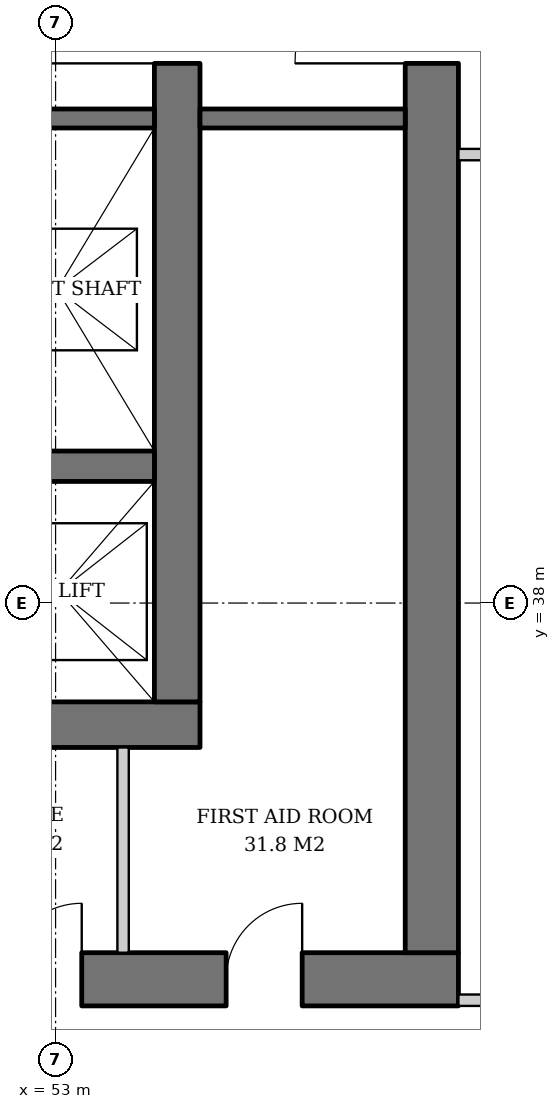
"""IFC4 building model, lengths in metres.
Left out: names, types, materials, properties, quantities, classifications, styles, units other than length and angle.
Written with IfcOpenShell. Run it as: python <this file> out.ifc"""

import sys

from ifc_helpers import new_model, si_unit, direction, frame, frame_2d, origin, place, context, subcontext, project, spatial, rectangle, extrude, element, fill, save


model = new_model("IFC4")
c1 = context("Model", 3, precision=1e-05, world=origin(), true_north=direction((0.0, 1.0)))
c2 = subcontext(c1, "Body", "Model", "MODEL_VIEW")
j1 = project(units=[si_unit("LENGTHUNIT", "METRE"), si_unit("PLANEANGLEUNIT", "RADIAN")], contexts=[c1])
p1 = place(None, origin())
s1 = spatial("IfcSite", under=j1, at=p1, CompositionType="ELEMENT")
p2 = place(p1, origin())
s2 = spatial("IfcBuilding", under=s1, at=p2, CompositionType="ELEMENT")
p3 = place(p2, frame((0.0, 0.0, 127.4)))
s3 = spatial("IfcBuildingStorey", under=s2, at=p3, CompositionType="ELEMENT", Elevation=127.4)
p4 = place(p3, frame((35.1, 36.4, 0.0), z_axis=(0.0, 0.0, 1.0), x_axis=(1.0, 0.0, 0.0)))
e1 = element("IfcWall", 1, at=p4, inside=s3, PredefinedType="SHEAR", context=c2, shape_type="SweptSolid", body=[
    extrude(rectangle(XDim=19.8, YDim=0.6, at=frame_2d((9.9, 0.0))), origin(), (0.0, 0.0, 1.0), 3.8),
])
p5 = place(p4, frame((3.9, 0.0, 0.0)))
e2 = element("IfcOpeningElement", 2, at=p5, cuts=e1, PredefinedType="OPENING", context=c2, shape_type="SweptSolid", body=[
    extrude(rectangle(XDim=1.0, YDim=2.1, at=frame_2d((0.5, 1.05))), frame((0.0, 0.31, 0.0), z_axis=(0.0, -1.0, 0.0), x_axis=(1.0, 0.0, 0.0)), (0.0, 0.0, 1.0), 0.62),
])
p6 = place(p4, frame((15.35, 0.0, 0.0)))
e3 = element("IfcOpeningElement", 3, at=p6, cuts=e1, PredefinedType="OPENING", context=c2, shape_type="SweptSolid", body=[
    extrude(rectangle(XDim=1.0, YDim=2.1, at=frame_2d((0.5, 1.05))), frame((0.0, 0.31, 0.0), z_axis=(0.0, -1.0, 0.0), x_axis=(1.0, 0.0, 0.0)), (0.0, 0.0, 1.0), 0.62),
])
p7 = place(p3, frame((54.6, 36.7, 0.0), z_axis=(0.0, 0.0, 1.0), x_axis=(0.0, 1.0, 0.0)))
e4 = element("IfcWall", 4, at=p7, inside=s3, PredefinedType="SHEAR", context=c2, shape_type="SweptSolid", body=[
    extrude(rectangle(XDim=18.6, YDim=0.6, at=frame_2d((9.3, 0.0))), origin(), (0.0, 0.0, 1.0), 3.8),
])
p8 = place(p7, frame((8.4, 0.0, 0.0)))
e5 = element("IfcOpeningElement", 5, at=p8, cuts=e4, PredefinedType="OPENING", context=c2, shape_type="SweptSolid", body=[
    extrude(rectangle(XDim=1.8, YDim=2.4, at=frame_2d((0.9, 1.2))), frame((0.0, 0.31, 0.0), z_axis=(0.0, -1.0, 0.0), x_axis=(1.0, 0.0, 0.0)), (0.0, 0.0, 1.0), 0.62),
])
p9 = place(p3, frame((31.7, 33.05, 0.0), z_axis=(0.0, 0.0, 1.0), x_axis=(1.0, 0.0, 0.0)))
e6 = element("IfcWall", 6, at=p9, inside=s3, PredefinedType="SHEAR", context=c2, shape_type="SweptSolid", body=[
    extrude(rectangle(XDim=26.6, YDim=0.7, at=frame_2d((13.3, 0.0))), origin(), (0.0, 0.0, 1.0), 3.8),
])
p10 = place(p9, frame((7.3, 0.0, 0.0)))
e7 = element("IfcOpeningElement", 7, at=p10, cuts=e6, PredefinedType="OPENING", context=c2, shape_type="SweptSolid", body=[
    extrude(rectangle(XDim=1.0, YDim=2.1, at=frame_2d((0.5, 1.05))), frame((0.0, 0.36, 0.0), z_axis=(0.0, -1.0, 0.0), x_axis=(1.0, 0.0, 0.0)), (0.0, 0.0, 1.0), 0.72),
])
p11 = place(p9, frame((18.75, 0.0, 0.0)))
e8 = element("IfcOpeningElement", 8, at=p11, cuts=e6, PredefinedType="OPENING", context=c2, shape_type="SweptSolid", body=[
    extrude(rectangle(XDim=1.0, YDim=2.1, at=frame_2d((0.5, 1.05))), frame((0.0, 0.36, 0.0), z_axis=(0.0, -1.0, 0.0), x_axis=(1.0, 0.0, 0.0)), (0.0, 0.0, 1.0), 0.72),
])
p12 = place(p9, frame((1.85, 0.0, 0.0)))
e9 = element("IfcOpeningElement", 9, at=p12, cuts=e6, PredefinedType="OPENING", context=c2, shape_type="SweptSolid", body=[
    extrude(rectangle(XDim=1.0, YDim=2.1, at=frame_2d((0.5, 1.05))), frame((0.0, 0.36, 0.0), z_axis=(0.0, -1.0, 0.0), x_axis=(1.0, 0.0, 0.0)), (0.0, 0.0, 1.0), 0.72),
])
p13 = place(p9, frame((4.7, 0.0, 0.0)))
e10 = element("IfcOpeningElement", 10, at=p13, cuts=e6, PredefinedType="OPENING", context=c2, shape_type="SweptSolid", body=[
    extrude(rectangle(XDim=1.0, YDim=2.1, at=frame_2d((0.5, 1.05))), frame((0.0, 0.36, 0.0), z_axis=(0.0, -1.0, 0.0), x_axis=(1.0, 0.0, 0.0)), (0.0, 0.0, 1.0), 0.72),
])
p14 = place(p9, frame((12.44, 0.0, 0.0)))
e11 = element("IfcOpeningElement", 11, at=p14, cuts=e6, PredefinedType="OPENING", context=c2, shape_type="SweptSolid", body=[
    extrude(rectangle(XDim=1.0, YDim=2.1, at=frame_2d((0.5, 1.05))), frame((0.0, 0.36, 0.0), z_axis=(0.0, -1.0, 0.0), x_axis=(1.0, 0.0, 0.0)), (0.0, 0.0, 1.0), 0.72),
])
p15 = place(p9, frame((20.644, 0.0, 0.0)))
e12 = element("IfcOpeningElement", 12, at=p15, cuts=e6, PredefinedType="OPENING", context=c2, shape_type="SweptSolid", body=[
    extrude(rectangle(XDim=1.0, YDim=2.1, at=frame_2d((0.5, 1.05))), frame((0.0, 0.36, 0.0), z_axis=(0.0, -1.0, 0.0), x_axis=(1.0, 0.0, 0.0)), (0.0, 0.0, 1.0), 0.72),
])
p16 = place(p9, frame((23.544, 0.0, 0.0)))
e13 = element("IfcOpeningElement", 13, at=p16, cuts=e6, PredefinedType="OPENING", context=c2, shape_type="SweptSolid", body=[
    extrude(rectangle(XDim=1.0, YDim=2.1, at=frame_2d((0.5, 1.05))), frame((0.0, 0.36, 0.0), z_axis=(0.0, -1.0, 0.0), x_axis=(1.0, 0.0, 0.0)), (0.0, 0.0, 1.0), 0.72),
])
p17 = place(p3, frame((57.95, 33.4, 0.0), z_axis=(0.0, 0.0, 1.0), x_axis=(0.0, 1.0, 0.0)))
e14 = element("IfcWall", 14, at=p17, inside=s3, PredefinedType="SHEAR", context=c2, shape_type="SweptSolid", body=[
    extrude(rectangle(XDim=25.2, YDim=0.7, at=frame_2d((12.6, 0.0))), origin(), (0.0, 0.0, 1.0), 3.8),
])
p18 = place(p17, frame((11.7, 0.0, 0.0)))
e15 = element("IfcOpeningElement", 15, at=p18, cuts=e14, PredefinedType="OPENING", context=c2, shape_type="SweptSolid", body=[
    extrude(rectangle(XDim=1.8, YDim=2.4, at=frame_2d((0.9, 1.2))), frame((0.0, 0.36, 0.0), z_axis=(0.0, -1.0, 0.0), x_axis=(1.0, 0.0, 0.0)), (0.0, 0.0, 1.0), 0.72),
])
p19 = place(p3, frame((35.7, 39.8, 0.0), z_axis=(0.0, 0.0, 1.0), x_axis=(1.0, 0.0, 0.0)))
e16 = element("IfcWall", 16, at=p19, inside=s3, PredefinedType="SHEAR", context=c2, shape_type="SweptSolid", body=[
    extrude(rectangle(XDim=18.6, YDim=0.4, at=frame_2d((9.3, 0.0))), origin(), (0.0, 0.0, 1.0), 3.8),
])
p20 = place(p3, frame((48.93, 44.375, 0.0), z_axis=(0.0, 0.0, 1.0), x_axis=(1.0, 0.0, 0.0)))
e17 = element("IfcWall", 17, at=p20, inside=s3, PredefinedType="SHEAR", context=c2, shape_type="SweptSolid", body=[
    extrude(rectangle(XDim=5.37, YDim=0.25, at=frame_2d((2.685, 0.0))), origin(), (0.0, 0.0, 1.0), 3.8),
])
p21 = place(p3, frame((54.9, 44.375, 0.0), z_axis=(0.0, 0.0, 1.0), x_axis=(1.0, 0.0, 0.0)))
e18 = element("IfcWall", 18, at=p21, inside=s3, PredefinedType="SOLIDWALL", context=c2, shape_type="SweptSolid", body=[
    extrude(rectangle(XDim=2.7, YDim=0.25, at=frame_2d((1.35, 0.0))), origin(), (0.0, 0.0, 1.0), 3.62),
])
p22 = place(p3, frame((53.888, 33.4, 0.0), z_axis=(0.0, 0.0, 1.0), x_axis=(0.0, 1.0, 0.0)))
e19 = element("IfcWall", 19, at=p22, inside=s3, PredefinedType="SOLIDWALL", context=c2, shape_type="SweptSolid", body=[
    extrude(rectangle(XDim=2.7, YDim=0.15, at=frame_2d((1.35, 0.0))), origin(), (0.0, 0.0, 1.0), 3.62),
])
for number, where, z_axis, x_axis in (
    (20, (58.3, 32.775, 0.0), (0.0, 0.0, 1.0), (1.0, 0.0, 0.0)),
    (21, (58.3, 43.9, 0.0), (0.0, 0.0, 1.0), (1.0, 0.0, 0.0)),
):
    element("IfcWall", number, at=place(p3, frame(where, z_axis=z_axis, x_axis=x_axis)), inside=s3, PredefinedType="PARTITIONING", context=c2, shape_type="SweptSolid", body=[
        extrude(rectangle(XDim=2.325, YDim=0.15, at=frame_2d((1.163, 0.0))), origin(), (0.0, 0.0, 1.0), 3.62),
    ])
p23 = place(p8, origin())
e22 = element("IfcDoor", 22, at=p23, inside=s3, OperationType="DOUBLE_DOOR_SINGLE_SWING", PredefinedType="DOOR", context=c2, shape_type="SweptSolid", body=[
    extrude(rectangle(XDim=1.8, YDim=2.4, at=frame_2d((0.9, 1.2))), frame((0.0, 0.025, 0.0), z_axis=(0.0, -1.0, 0.0), x_axis=(1.0, 0.0, 0.0)), (0.0, 0.0, 1.0), 0.05),
])
fill(e5, e22)
p24 = place(p18, origin())
e23 = element("IfcDoor", 23, at=p24, inside=s3, OperationType="DOUBLE_DOOR_SINGLE_SWING", PredefinedType="DOOR", context=c2, shape_type="SweptSolid", body=[
    extrude(rectangle(XDim=1.8, YDim=2.4, at=frame_2d((0.9, 1.2))), frame((0.0, 0.025, 0.0), z_axis=(0.0, -1.0, 0.0), x_axis=(1.0, 0.0, 0.0)), (0.0, 0.0, 1.0), 0.05),
])
fill(e15, e23)
p25 = place(p15, origin())
e24 = element("IfcDoor", 24, at=p25, inside=s3, OperationType="SINGLE_SWING_RIGHT", PredefinedType="DOOR", context=c2, shape_type="SweptSolid", body=[
    extrude(rectangle(XDim=1.0, YDim=2.1, at=frame_2d((0.5, 1.05))), frame((0.0, 0.34, 0.0), z_axis=(0.0, -1.0, 0.0), x_axis=(1.0, 0.0, 0.0)), (0.0, 0.0, 1.0), 0.05),
])
fill(e12, e24)
p26 = place(p16, origin())
e25 = element("IfcDoor", 25, at=p26, inside=s3, OperationType="SINGLE_SWING_RIGHT", PredefinedType="DOOR", context=c2, shape_type="SweptSolid", body=[
    extrude(rectangle(XDim=1.0, YDim=2.1, at=frame_2d((0.5, 1.05))), frame((0.0, 0.34, 0.0), z_axis=(0.0, -1.0, 0.0), x_axis=(1.0, 0.0, 0.0)), (0.0, 0.0, 1.0), 0.05),
])
fill(e13, e25)
save(model, sys.argv[1])
